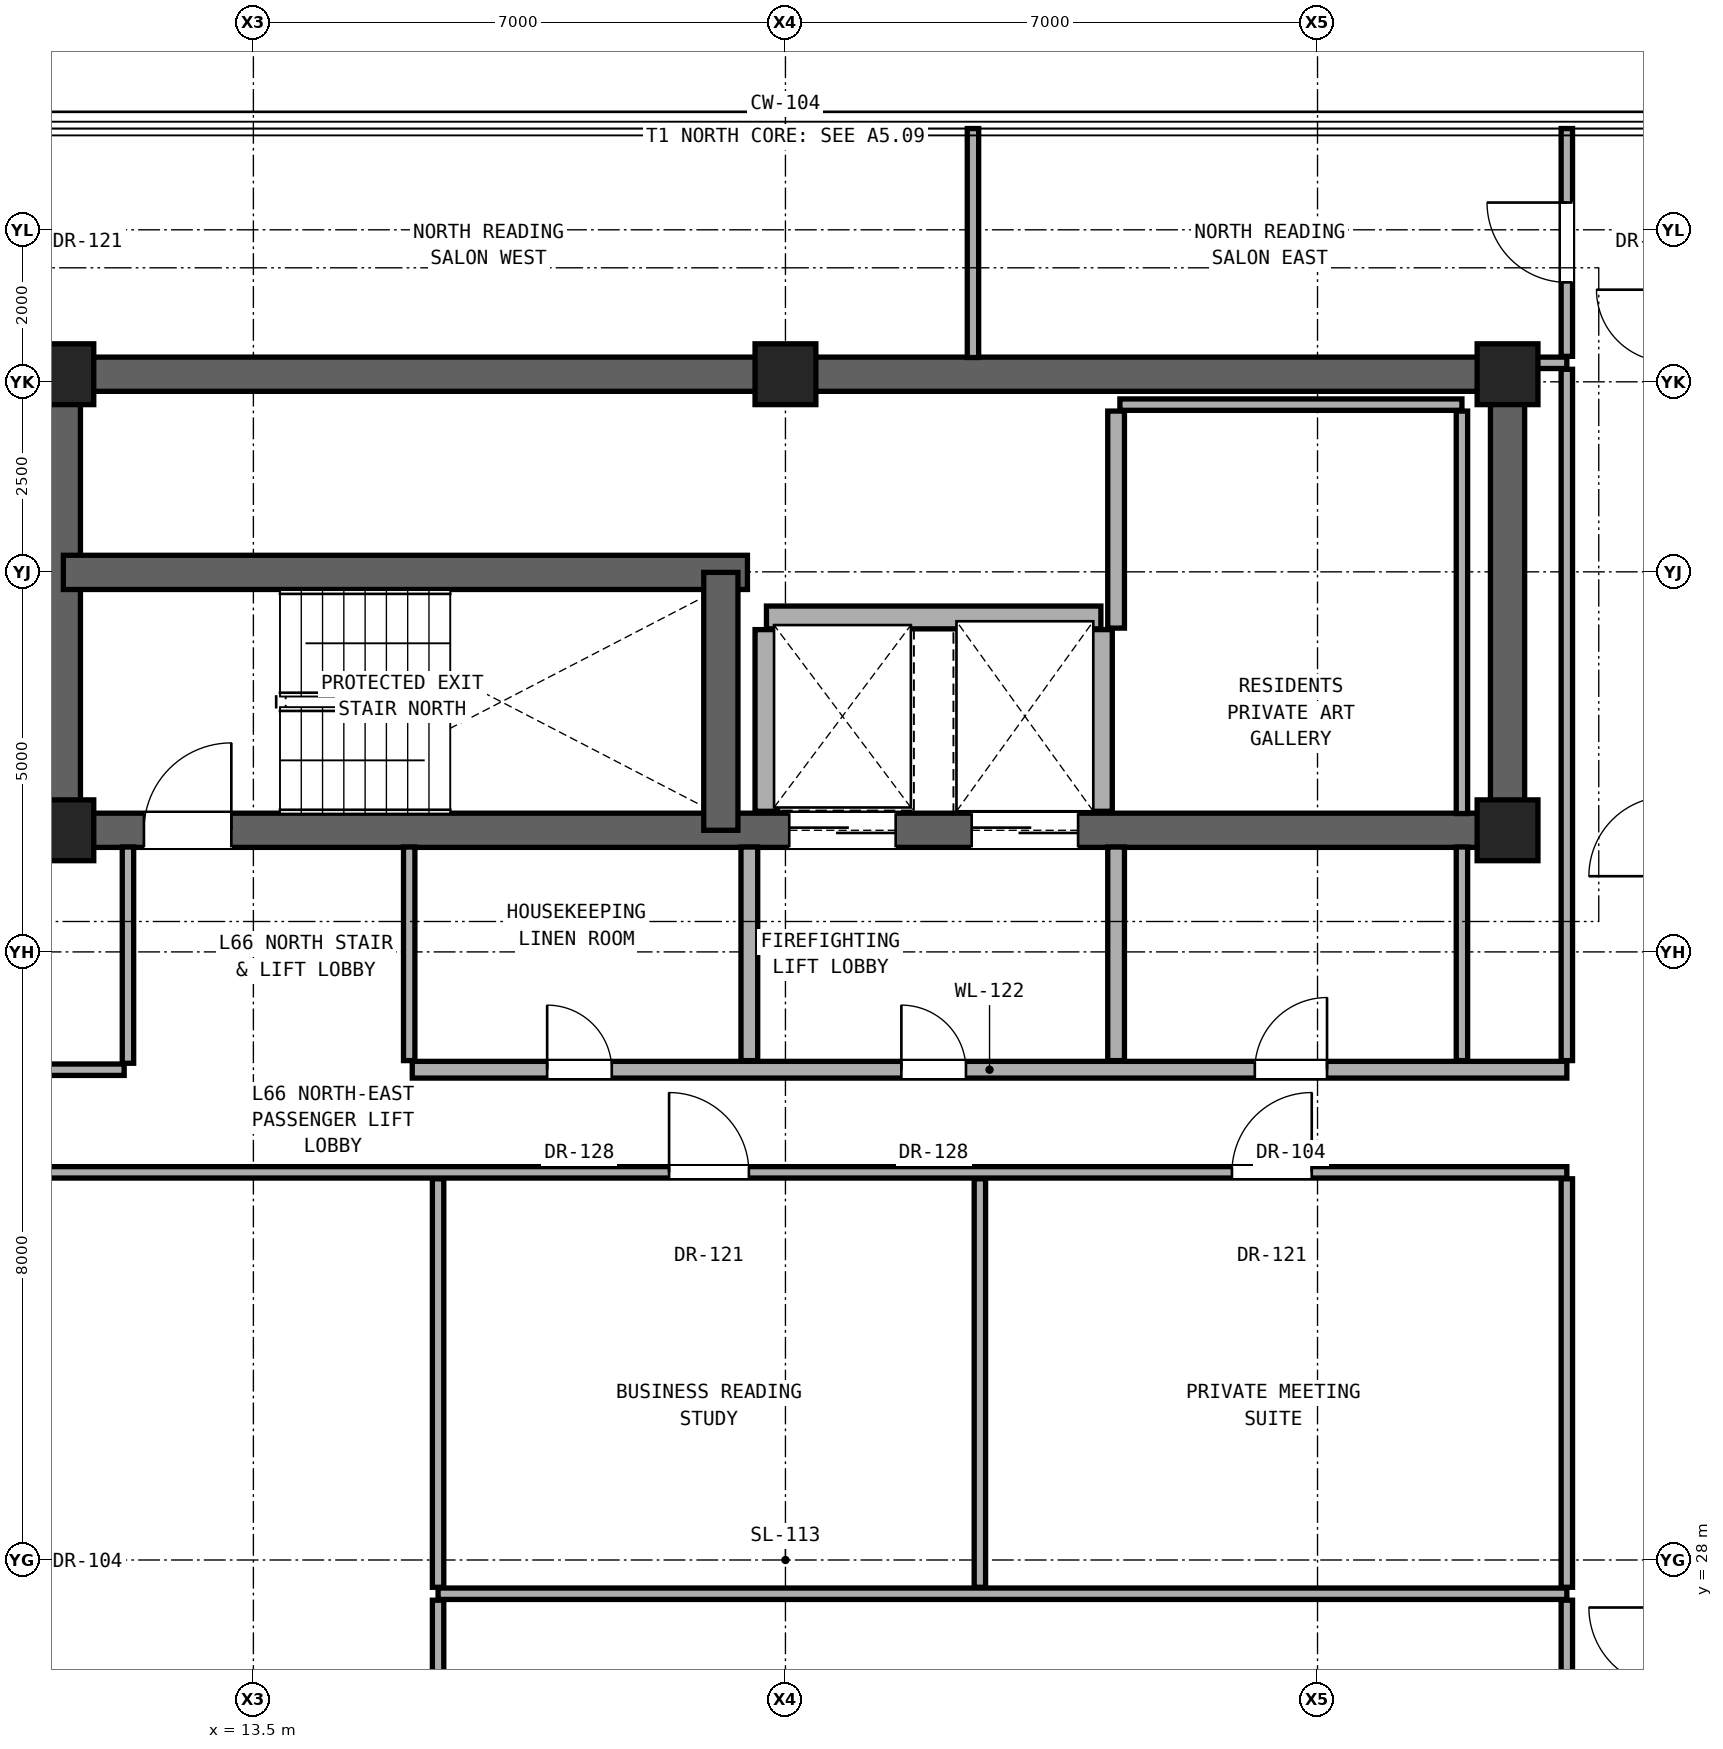
"""IFC4 building model, lengths in metres.
Left out: names, types, materials, properties, quantities, classifications, styles, units other than length and angle.
Written with IfcOpenShell. Run it as: python <this file> out.ifc"""

import sys

from ifc_helpers import new_model, si_unit, direction, frame, frame_2d, origin, origin_2d, place, context, subcontext, project, spatial, rectangle, extrude, element, fill, save


model = new_model("IFC4")
c1 = context("Model", 3, precision=1e-05, world=origin(), true_north=direction((0.0, 1.0)))
c2 = subcontext(c1, "Body", "Model", "MODEL_VIEW")
j1 = project(units=[si_unit("LENGTHUNIT", "METRE"), si_unit("PLANEANGLEUNIT", "RADIAN")], contexts=[c1])
p1 = place(None, origin())
s1 = spatial("IfcSite", under=j1, at=p1, CompositionType="ELEMENT")
p2 = place(p1, origin())
s2 = spatial("IfcBuilding", under=s1, at=p2, CompositionType="ELEMENT")
p3 = place(p2, frame((0.0, 0.0, 232.6)))
s3 = spatial("IfcBuildingStorey", under=s2, at=p3, CompositionType="ELEMENT", Elevation=232.6)
for number, where, z_axis, x_axis in (
    (1, (11.0, 37.6, 0.0), (0.0, 0.0, 1.0), (1.0, 0.0, 0.0)),
    (2, (30.0, 37.6, 0.0), (0.0, 0.0, 1.0), (1.0, 0.0, 0.0)),
    (3, (11.0, 43.6, 0.0), (0.0, 0.0, 1.0), (1.0, 0.0, 0.0)),
    (4, (20.5, 43.6, 0.0), (0.0, 0.0, 1.0), (1.0, 0.0, 0.0)),
    (5, (30.0, 43.6, 0.0), (0.0, 0.0, 1.0), (1.0, 0.0, 0.0)),
):
    element("IfcColumn", number, at=place(p3, frame(where, z_axis=z_axis, x_axis=x_axis)), inside=s3, PredefinedType="COLUMN", context=c2, shape_type="SweptSolid", body=[
        extrude(rectangle(XDim=0.8, YDim=0.8, at=origin_2d()), origin(), (0.0, 0.0, 1.0), 3.3),
    ])
p4 = place(p3, frame((11.0, 43.6, 0.0), z_axis=(0.0, 0.0, 1.0), x_axis=(1.0, 0.0, 0.0)))
e6 = element("IfcWall", 6, at=p4, inside=s3, PredefinedType="SHEAR", context=c2, shape_type="SweptSolid", body=[
    extrude(rectangle(XDim=19.0, YDim=0.45, at=frame_2d((9.5, 0.0))), origin(), (0.0, 0.0, 1.0), 3.1),
])
for number, where, z_axis, x_axis in (
    (7, (11.0, 37.6, 0.0), (0.0, 0.0, 1.0), (0.0, 1.0, 0.0)),
    (8, (30.0, 37.6, 0.0), (0.0, 0.0, 1.0), (0.0, 1.0, 0.0)),
):
    element("IfcWall", number, at=place(p3, frame(where, z_axis=z_axis, x_axis=x_axis)), inside=s3, PredefinedType="SHEAR", context=c2, shape_type="SweptSolid", body=[
        extrude(rectangle(XDim=6.0, YDim=0.45, at=frame_2d((3.0, 0.0))), origin(), (0.0, 0.0, 1.0), 3.1),
    ])
p5 = place(p3, frame((11.0, 37.6, 0.0), z_axis=(0.0, 0.0, 1.0), x_axis=(1.0, 0.0, 0.0)))
e9 = element("IfcWall", 9, at=p5, inside=s3, PredefinedType="SHEAR", context=c2, shape_type="SweptSolid", body=[
    extrude(rectangle(XDim=19.0, YDim=0.45, at=frame_2d((9.5, 0.0))), origin(), (0.0, 0.0, 1.0), 3.1),
])
p6 = place(p5, frame((1.06, 0.0, 0.0)))
e10 = element("IfcOpeningElement", 10, at=p6, cuts=e9, PredefinedType="OPENING", context=c2, shape_type="SweptSolid", body=[
    extrude(rectangle(XDim=1.15, YDim=2.2, at=frame_2d((0.575, 1.1))), frame((0.0, 0.235, 0.0), z_axis=(0.0, -1.0, 0.0), x_axis=(1.0, 0.0, 0.0)), (0.0, 0.0, 1.0), 0.47),
])
p7 = place(p5, frame((9.55, 0.0, 0.0)))
e11 = element("IfcOpeningElement", 11, at=p7, cuts=e9, PredefinedType="OPENING", context=c2, shape_type="SweptSolid", body=[
    extrude(rectangle(XDim=1.4, YDim=2.35, at=frame_2d((0.7, 1.175))), frame((0.0, 0.235, 0.0), z_axis=(0.0, -1.0, 0.0), x_axis=(1.0, 0.0, 0.0)), (0.0, 0.0, 1.0), 0.47),
])
p8 = place(p5, frame((11.95, 0.0, 0.0)))
e12 = element("IfcOpeningElement", 12, at=p8, cuts=e9, PredefinedType="OPENING", context=c2, shape_type="SweptSolid", body=[
    extrude(rectangle(XDim=1.4, YDim=2.35, at=frame_2d((0.7, 1.175))), frame((0.0, 0.235, 0.0), z_axis=(0.0, -1.0, 0.0), x_axis=(1.0, 0.0, 0.0)), (0.0, 0.0, 1.0), 0.47),
])
p9 = place(p3, frame((11.0, 40.993, 0.0), z_axis=(0.0, 0.0, 1.0), x_axis=(1.0, 0.0, 0.0)))
e13 = element("IfcWall", 13, at=p9, inside=s3, PredefinedType="SHEAR", context=c2, shape_type="SweptSolid", body=[
    extrude(rectangle(XDim=9.0, YDim=0.45, at=frame_2d((4.5, 0.0))), origin(), (0.0, 0.0, 1.0), 3.1),
])
p10 = place(p3, frame((19.65, 37.6, 0.0), z_axis=(0.0, 0.0, 1.0), x_axis=(0.0, 1.0, 0.0)))
e14 = element("IfcWall", 14, at=p10, inside=s3, PredefinedType="SHEAR", context=c2, shape_type="SweptSolid", body=[
    extrude(rectangle(XDim=3.393, YDim=0.45, at=frame_2d((1.696, 0.0))), origin(), (0.0, 0.0, 1.0), 3.1),
])
p11 = place(p3, frame((15.93, 27.556, 0.0), z_axis=(0.0, 0.0, 1.0), x_axis=(1.0, 0.0, 0.0)))
e15 = element("IfcWall", 15, at=p11, inside=s3, PredefinedType="PARTITIONING", context=c2, shape_type="SweptSolid", body=[
    extrude(rectangle(XDim=14.85, YDim=0.15, at=frame_2d((7.425, 0.0))), origin(), (0.0, 0.0, 1.0), 2.236),
])
p12 = place(p3, frame((10.22, 33.1, 0.0), z_axis=(0.0, 0.0, 1.0), x_axis=(1.0, 0.0, 0.0)))
e16 = element("IfcWall", 16, at=p12, inside=s3, PredefinedType="PARTITIONING", context=c2, shape_type="SweptSolid", body=[
    extrude(rectangle(XDim=20.56, YDim=0.15, at=frame_2d((10.28, 0.0))), origin(), (0.0, 0.0, 1.0), 2.236),
])
p13 = place(p12, frame((8.749, 0.0, 0.0)))
e17 = element("IfcOpeningElement", 17, at=p13, cuts=e16, PredefinedType="OPENING", context=c2, shape_type="SweptSolid", body=[
    extrude(rectangle(XDim=1.05, YDim=2.2, at=frame_2d((0.525, 1.1))), frame((0.0, 0.085, 0.0), z_axis=(0.0, -1.0, 0.0), x_axis=(1.0, 0.0, 0.0)), (0.0, 0.0, 1.0), 0.17),
])
p14 = place(p12, frame((16.154, 0.0, 0.0)))
e18 = element("IfcOpeningElement", 18, at=p14, cuts=e16, PredefinedType="OPENING", context=c2, shape_type="SweptSolid", body=[
    extrude(rectangle(XDim=1.05, YDim=2.2, at=frame_2d((0.525, 1.1))), frame((0.0, 0.085, 0.0), z_axis=(0.0, -1.0, 0.0), x_axis=(1.0, 0.0, 0.0)), (0.0, 0.0, 1.0), 0.17),
])
p15 = place(p3, frame((10.22, 34.45, 0.0), z_axis=(0.0, 0.0, 1.0), x_axis=(1.0, 0.0, 0.0)))
e19 = element("IfcWall", 19, at=p15, inside=s3, PredefinedType="PARTITIONING", context=c2, shape_type="SweptSolid", body=[
    extrude(rectangle(XDim=1.58, YDim=0.15, at=frame_2d((0.79, 0.0))), origin(), (0.0, 0.0, 1.0), 2.236),
])
p16 = place(p3, frame((15.59, 34.45, 0.0), z_axis=(0.0, 0.0, 1.0), x_axis=(1.0, 0.0, 0.0)))
e20 = element("IfcWall", 20, at=p16, inside=s3, PredefinedType="SOLIDWALL", context=c2, shape_type="SweptSolid", body=[
    extrude(rectangle(XDim=15.19, YDim=0.22, at=frame_2d((7.595, 0.0))), origin(), (0.0, 0.0, 1.0), 2.236),
])
p17 = place(p16, frame((6.435, 0.0, 0.0)))
e21 = element("IfcOpeningElement", 21, at=p17, cuts=e20, PredefinedType="OPENING", context=c2, shape_type="SweptSolid", body=[
    extrude(rectangle(XDim=0.85, YDim=2.01, at=frame_2d((0.425, 1.005))), frame((0.0, 0.12, 0.0), z_axis=(0.0, -1.0, 0.0), x_axis=(1.0, 0.0, 0.0)), (0.0, 0.0, 1.0), 0.24),
])
p18 = place(p16, frame((11.085, 0.0, 0.0)))
e22 = element("IfcOpeningElement", 22, at=p18, cuts=e20, PredefinedType="OPENING", context=c2, shape_type="SweptSolid", body=[
    extrude(rectangle(XDim=0.95, YDim=2.15, at=frame_2d((0.475, 1.075))), frame((0.0, 0.12, 0.0), z_axis=(0.0, -1.0, 0.0), x_axis=(1.0, 0.0, 0.0)), (0.0, 0.0, 1.0), 0.24),
])
p19 = place(p16, frame((1.775, 0.0, 0.0)))
e23 = element("IfcOpeningElement", 23, at=p19, cuts=e20, PredefinedType="OPENING", context=c2, shape_type="SweptSolid", body=[
    extrude(rectangle(XDim=0.85, YDim=2.01, at=frame_2d((0.425, 1.005))), frame((0.0, 0.12, 0.0), z_axis=(0.0, -1.0, 0.0), x_axis=(1.0, 0.0, 0.0)), (0.0, 0.0, 1.0), 0.24),
])
p20 = place(p3, frame((20.25, 40.4, 0.0), z_axis=(0.0, 0.0, 1.0), x_axis=(1.0, 0.0, 0.0)))
e24 = element("IfcWall", 24, at=p20, inside=s3, PredefinedType="SOLIDWALL", context=c2, shape_type="SweptSolid", body=[
    extrude(rectangle(XDim=4.4, YDim=0.3, at=frame_2d((2.2, 0.0))), origin(), (0.0, 0.0, 1.0), 3.1),
])
p21 = place(p3, frame((24.9, 43.2, 0.0), z_axis=(0.0, 0.0, 1.0), x_axis=(1.0, 0.0, 0.0)))
e25 = element("IfcWall", 25, at=p21, inside=s3, PredefinedType="PARTITIONING", context=c2, shape_type="SweptSolid", body=[
    extrude(rectangle(XDim=4.5, YDim=0.15, at=frame_2d((2.25, 0.0))), origin(), (0.0, 0.0, 1.0), 3.1),
])
p22 = place(p3, frame((30.22, 43.75, 0.0), z_axis=(0.0, 0.0, 1.0), x_axis=(1.0, 0.0, 0.0)))
e26 = element("IfcWall", 26, at=p22, inside=s3, PredefinedType="PARTITIONING", context=c2, shape_type="SweptSolid", body=[
    extrude(rectangle(XDim=0.56, YDim=0.15, at=frame_2d((0.28, 0.0))), origin(), (0.0, 0.0, 1.0), 3.1),
])
p23 = place(p3, frame((11.85, 34.535, 0.0), z_axis=(0.0, 0.0, 1.0), x_axis=(0.0, 1.0, 0.0)))
e27 = element("IfcWall", 27, at=p23, inside=s3, PredefinedType="PARTITIONING", context=c2, shape_type="SweptSolid", body=[
    extrude(rectangle(XDim=2.845, YDim=0.15, at=frame_2d((1.422, 0.0))), origin(), (0.0, 0.0, 1.0), 3.1),
])
p24 = place(p3, frame((15.55, 34.57, 0.0), z_axis=(0.0, 0.0, 1.0), x_axis=(0.0, 1.0, 0.0)))
e28 = element("IfcWall", 28, at=p24, inside=s3, PredefinedType="PARTITIONING", context=c2, shape_type="SweptSolid", body=[
    extrude(rectangle(XDim=2.81, YDim=0.15, at=frame_2d((1.405, 0.0))), origin(), (0.0, 0.0, 1.0), 3.1),
])
p25 = place(p3, frame((15.93, 22.935, 0.0), z_axis=(0.0, 0.0, 1.0), x_axis=(0.0, 1.0, 0.0)))
e29 = element("IfcWall", 29, at=p25, inside=s3, PredefinedType="PARTITIONING", context=c2, shape_type="SweptSolid", body=[
    extrude(rectangle(XDim=4.536, YDim=0.15, at=frame_2d((2.268, 0.0))), origin(), (0.0, 0.0, 1.0), 2.236),
])
p26 = place(p3, frame((15.93, 27.641, 0.0), z_axis=(0.0, 0.0, 1.0), x_axis=(0.0, 1.0, 0.0)))
e30 = element("IfcWall", 30, at=p26, inside=s3, PredefinedType="PARTITIONING", context=c2, shape_type="SweptSolid", body=[
    extrude(rectangle(XDim=5.374, YDim=0.15, at=frame_2d((2.687, 0.0))), origin(), (0.0, 0.0, 1.0), 2.236),
])
p27 = place(p3, frame((20.025, 34.57, 0.0), z_axis=(0.0, 0.0, 1.0), x_axis=(0.0, 1.0, 0.0)))
e31 = element("IfcWall", 31, at=p27, inside=s3, PredefinedType="SOLIDWALL", context=c2, shape_type="SweptSolid", body=[
    extrude(rectangle(XDim=2.81, YDim=0.22, at=frame_2d((1.405, 0.0))), origin(), (0.0, 0.0, 1.0), 3.1),
])
p28 = place(p3, frame((20.25, 37.85, 0.0), z_axis=(0.0, 0.0, 1.0), x_axis=(0.0, 1.0, 0.0)))
e32 = element("IfcWall", 32, at=p28, inside=s3, PredefinedType="SOLIDWALL", context=c2, shape_type="SweptSolid", body=[
    extrude(rectangle(XDim=2.39, YDim=0.3, at=frame_2d((1.195, 0.0))), origin(), (0.0, 0.0, 1.0), 3.1),
])
p29 = place(p3, frame((22.967, 43.82, 0.0), z_axis=(0.0, 0.0, 1.0), x_axis=(0.0, 1.0, 0.0)))
e33 = element("IfcWall", 33, at=p29, inside=s3, PredefinedType="PARTITIONING", context=c2, shape_type="SweptSolid", body=[
    extrude(rectangle(XDim=3.012, YDim=0.15, at=frame_2d((1.506, 0.0))), origin(), (0.0, 0.0, 1.0), 3.1),
])
p30 = place(p3, frame((23.058, 27.641, 0.0), z_axis=(0.0, 0.0, 1.0), x_axis=(0.0, 1.0, 0.0)))
e34 = element("IfcWall", 34, at=p30, inside=s3, PredefinedType="PARTITIONING", context=c2, shape_type="SweptSolid", body=[
    extrude(rectangle(XDim=5.374, YDim=0.15, at=frame_2d((2.687, 0.0))), origin(), (0.0, 0.0, 1.0), 2.236),
])
p31 = place(p3, frame((24.65, 37.85, 0.0), z_axis=(0.0, 0.0, 1.0), x_axis=(0.0, 1.0, 0.0)))
e35 = element("IfcWall", 35, at=p31, inside=s3, PredefinedType="SOLIDWALL", context=c2, shape_type="SweptSolid", body=[
    extrude(rectangle(XDim=2.39, YDim=0.3, at=frame_2d((1.195, 0.0))), origin(), (0.0, 0.0, 1.0), 3.1),
])
p32 = place(p3, frame((24.85, 34.57, 0.0), z_axis=(0.0, 0.0, 1.0), x_axis=(0.0, 1.0, 0.0)))
e36 = element("IfcWall", 36, at=p32, inside=s3, PredefinedType="SOLIDWALL", context=c2, shape_type="SweptSolid", body=[
    extrude(rectangle(XDim=2.81, YDim=0.22, at=frame_2d((1.405, 0.0))), origin(), (0.0, 0.0, 1.0), 3.1),
])
p33 = place(p3, frame((24.85, 40.26, 0.0), z_axis=(0.0, 0.0, 1.0), x_axis=(0.0, 1.0, 0.0)))
e37 = element("IfcWall", 37, at=p33, inside=s3, PredefinedType="SOLIDWALL", context=c2, shape_type="SweptSolid", body=[
    extrude(rectangle(XDim=2.855, YDim=0.22, at=frame_2d((1.427, 0.0))), origin(), (0.0, 0.0, 1.0), 3.1),
])
p34 = place(p3, frame((29.4, 34.57, 0.0), z_axis=(0.0, 0.0, 1.0), x_axis=(0.0, 1.0, 0.0)))
e38 = element("IfcWall", 38, at=p34, inside=s3, PredefinedType="PARTITIONING", context=c2, shape_type="SweptSolid", body=[
    extrude(rectangle(XDim=2.81, YDim=0.15, at=frame_2d((1.405, 0.0))), origin(), (0.0, 0.0, 1.0), 3.1),
])
p35 = place(p3, frame((29.4, 37.82, 0.0), z_axis=(0.0, 0.0, 1.0), x_axis=(0.0, 1.0, 0.0)))
e39 = element("IfcWall", 39, at=p35, inside=s3, PredefinedType="PARTITIONING", context=c2, shape_type="SweptSolid", body=[
    extrude(rectangle(XDim=5.295, YDim=0.15, at=frame_2d((2.647, 0.0))), origin(), (0.0, 0.0, 1.0), 3.1),
])
p36 = place(p3, frame((30.78, 19.985, 0.0), z_axis=(0.0, 0.0, 1.0), x_axis=(0.0, 1.0, 0.0)))
e40 = element("IfcWall", 40, at=p36, inside=s3, PredefinedType="PARTITIONING", context=c2, shape_type="SweptSolid", body=[
    extrude(rectangle(XDim=7.486, YDim=0.15, at=frame_2d((3.743, 0.0))), origin(), (0.0, 0.0, 1.0), 2.396),
])
p37 = place(p3, frame((30.78, 27.641, 0.0), z_axis=(0.0, 0.0, 1.0), x_axis=(0.0, 1.0, 0.0)))
e41 = element("IfcWall", 41, at=p37, inside=s3, PredefinedType="PARTITIONING", context=c2, shape_type="SweptSolid", body=[
    extrude(rectangle(XDim=5.374, YDim=0.15, at=frame_2d((2.687, 0.0))), origin(), (0.0, 0.0, 1.0), 2.396),
])
p38 = place(p3, frame((30.78, 34.57, 0.0), z_axis=(0.0, 0.0, 1.0), x_axis=(0.0, 1.0, 0.0)))
e42 = element("IfcWall", 42, at=p38, inside=s3, PredefinedType="PARTITIONING", context=c2, shape_type="SweptSolid", body=[
    extrude(rectangle(XDim=9.095, YDim=0.15, at=frame_2d((4.547, 0.0))), origin(), (0.0, 0.0, 1.0), 2.492),
])
p39 = place(p3, frame((30.78, 43.835, 0.0), z_axis=(0.0, 0.0, 1.0), x_axis=(0.0, 1.0, 0.0)))
e43 = element("IfcWall", 43, at=p39, inside=s3, PredefinedType="PARTITIONING", context=c2, shape_type="SweptSolid", body=[
    extrude(rectangle(XDim=2.997, YDim=0.15, at=frame_2d((1.499, 0.0))), origin(), (0.0, 0.0, 1.0), 3.1),
])
p40 = place(p39, frame((0.973, 0.0, 0.0)))
e44 = element("IfcOpeningElement", 44, at=p40, cuts=e43, PredefinedType="OPENING", context=c2, shape_type="SweptSolid", body=[
    extrude(rectangle(XDim=1.05, YDim=2.2, at=frame_2d((0.525, 1.1))), frame((0.0, 0.085, 0.0), z_axis=(0.0, -1.0, 0.0), x_axis=(1.0, 0.0, 0.0)), (0.0, 0.0, 1.0), 0.17),
])
p41 = place(p6, origin())
e45 = element("IfcDoor", 45, at=p41, inside=s3, OperationType="SINGLE_SWING_RIGHT", PredefinedType="DOOR", context=c2, shape_type="SweptSolid", body=[
    extrude(rectangle(XDim=1.15, YDim=2.2, at=frame_2d((0.575, 1.1))), frame((0.0, 0.025, 0.0), z_axis=(0.0, -1.0, 0.0), x_axis=(1.0, 0.0, 0.0)), (0.0, 0.0, 1.0), 0.05),
])
fill(e10, e45)
p42 = place(p17, origin())
e46 = element("IfcDoor", 46, at=p42, inside=s3, OperationType="SINGLE_SWING_LEFT", PredefinedType="DOOR", context=c2, shape_type="SweptSolid", body=[
    extrude(rectangle(XDim=0.85, YDim=2.01, at=frame_2d((0.425, 1.005))), frame((0.0, 0.025, 0.0), z_axis=(0.0, -1.0, 0.0), x_axis=(1.0, 0.0, 0.0)), (0.0, 0.0, 1.0), 0.05),
])
fill(e21, e46)
p43 = place(p18, origin())
e47 = element("IfcDoor", 47, at=p43, inside=s3, OperationType="SINGLE_SWING_RIGHT", PredefinedType="DOOR", context=c2, shape_type="SweptSolid", body=[
    extrude(rectangle(XDim=0.95, YDim=2.15, at=frame_2d((0.475, 1.075))), frame((0.0, 0.025, 0.0), z_axis=(0.0, -1.0, 0.0), x_axis=(1.0, 0.0, 0.0)), (0.0, 0.0, 1.0), 0.05),
])
fill(e22, e47)
p44 = place(p19, origin())
e48 = element("IfcDoor", 48, at=p44, inside=s3, OperationType="SINGLE_SWING_LEFT", PredefinedType="DOOR", context=c2, shape_type="SweptSolid", body=[
    extrude(rectangle(XDim=0.85, YDim=2.01, at=frame_2d((0.425, 1.005))), frame((0.0, 0.025, 0.0), z_axis=(0.0, -1.0, 0.0), x_axis=(1.0, 0.0, 0.0)), (0.0, 0.0, 1.0), 0.05),
])
fill(e23, e48)
p45 = place(p13, origin())
e49 = element("IfcDoor", 49, at=p45, inside=s3, OperationType="SINGLE_SWING_LEFT", PredefinedType="DOOR", context=c2, shape_type="SweptSolid", body=[
    extrude(rectangle(XDim=1.05, YDim=2.2, at=frame_2d((0.525, 1.1))), frame((0.0, 0.025, 0.0), z_axis=(0.0, -1.0, 0.0), x_axis=(1.0, 0.0, 0.0)), (0.0, 0.0, 1.0), 0.05),
])
fill(e17, e49)
p46 = place(p14, origin())
e50 = element("IfcDoor", 50, at=p46, inside=s3, OperationType="SINGLE_SWING_RIGHT", PredefinedType="DOOR", context=c2, shape_type="SweptSolid", body=[
    extrude(rectangle(XDim=1.05, YDim=2.2, at=frame_2d((0.525, 1.1))), frame((0.0, 0.025, 0.0), z_axis=(0.0, -1.0, 0.0), x_axis=(1.0, 0.0, 0.0)), (0.0, 0.0, 1.0), 0.05),
])
fill(e18, e50)
p47 = place(p40, origin())
e51 = element("IfcDoor", 51, at=p47, inside=s3, OperationType="SINGLE_SWING_RIGHT", PredefinedType="DOOR", context=c2, shape_type="SweptSolid", body=[
    extrude(rectangle(XDim=1.05, YDim=2.2, at=frame_2d((0.525, 1.1))), frame((0.0, 0.025, 0.0), z_axis=(0.0, -1.0, 0.0), x_axis=(1.0, 0.0, 0.0)), (0.0, 0.0, 1.0), 0.05),
])
fill(e44, e51)
p48 = place(p7, origin())
e52 = element("IfcDoor", 52, at=p48, inside=s3, OperationType="DOUBLE_DOOR_SLIDING", PredefinedType="DOOR", context=c2, shape_type="SweptSolid", body=[
    extrude(rectangle(XDim=1.4, YDim=2.35, at=frame_2d((0.7, 1.175))), frame((0.0, 0.025, 0.0), z_axis=(0.0, -1.0, 0.0), x_axis=(1.0, 0.0, 0.0)), (0.0, 0.0, 1.0), 0.05),
])
fill(e11, e52)
p49 = place(p8, origin())
e53 = element("IfcDoor", 53, at=p49, inside=s3, OperationType="DOUBLE_DOOR_SLIDING", PredefinedType="DOOR", context=c2, shape_type="SweptSolid", body=[
    extrude(rectangle(XDim=1.4, YDim=2.35, at=frame_2d((0.7, 1.175))), frame((0.0, 0.025, 0.0), z_axis=(0.0, -1.0, 0.0), x_axis=(1.0, 0.0, 0.0)), (0.0, 0.0, 1.0), 0.05),
])
fill(e12, e53)
save(model, sys.argv[1])
